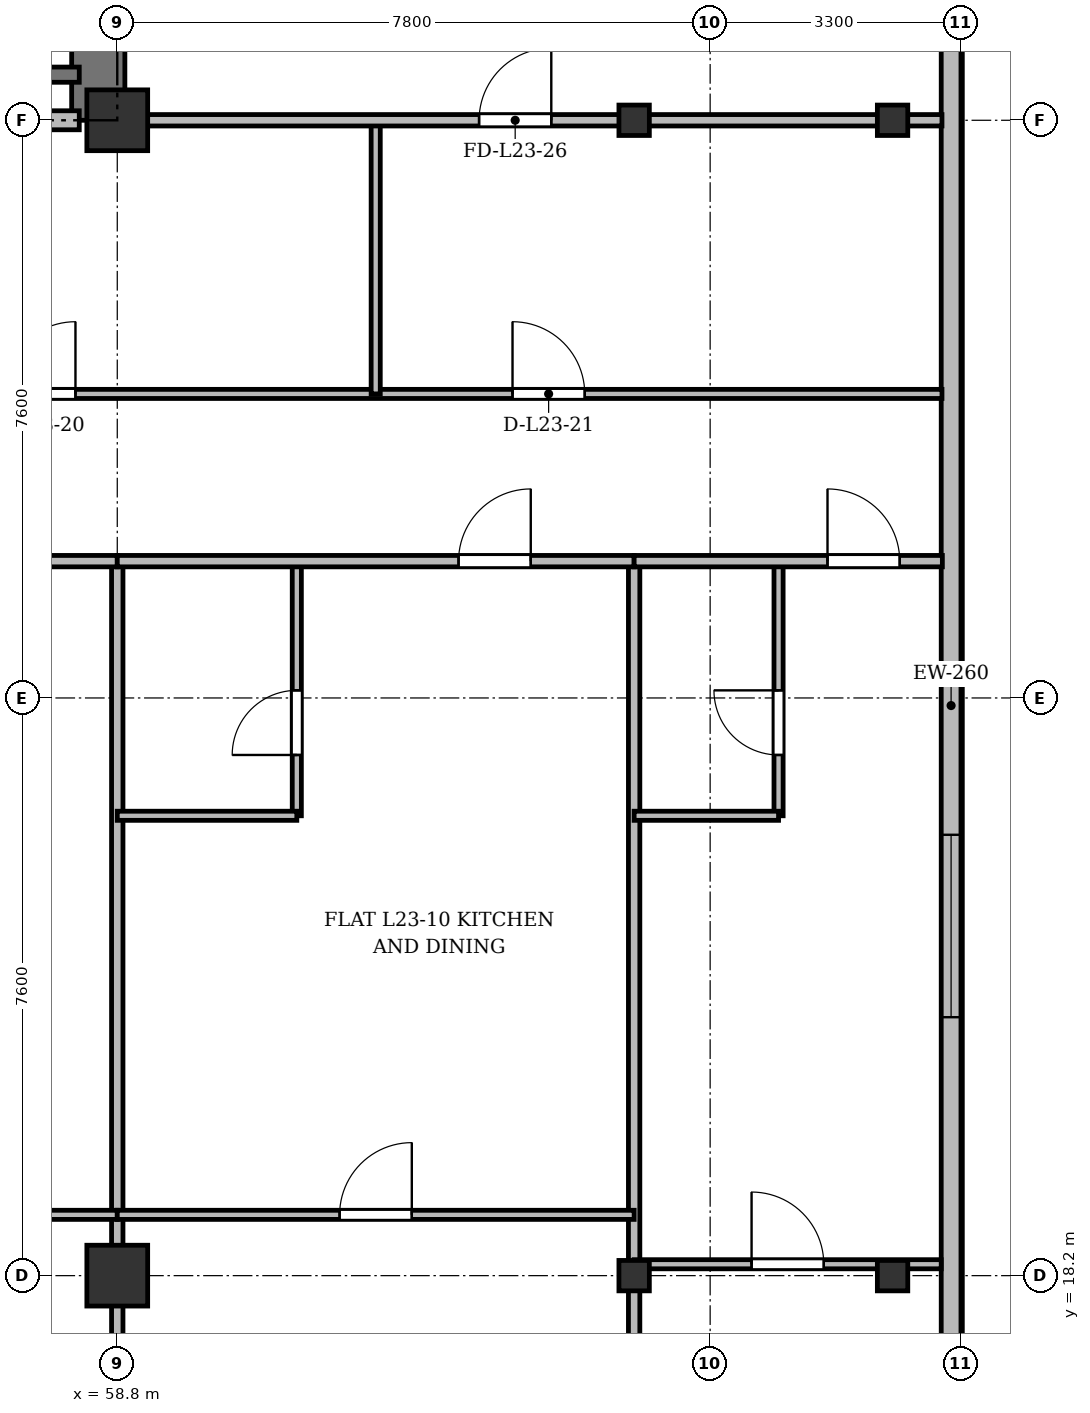
"""IFC4 building model, lengths in metres.
Left out: names, types, materials, properties, quantities, classifications, styles, units other than length and angle.
Written with IfcOpenShell. Run it as: python <this file> out.ifc"""

import sys

from ifc_helpers import new_model, si_unit, direction, frame, frame_2d, origin, origin_2d, place, context, subcontext, project, spatial, rectangle, i_section, extrude, source, transform, mapped, element, fill, save


model = new_model("IFC4")
c1 = context("Model", 3, precision=1e-05, world=origin(), true_north=direction((0.0, 1.0)))
c2 = subcontext(c1, "Body", "Model", "MODEL_VIEW")
j1 = project(units=[si_unit("LENGTHUNIT", "METRE"), si_unit("PLANEANGLEUNIT", "RADIAN")], contexts=[c1])
p1 = place(None, origin())
s1 = spatial("IfcSite", under=j1, at=p1, CompositionType="ELEMENT")
p2 = place(p1, origin())
s2 = spatial("IfcBuilding", under=s1, at=p2, CompositionType="ELEMENT")
p3 = place(p2, frame((0.0, 0.0, 92.5)))
s3 = spatial("IfcBuildingStorey", under=s2, at=p3, CompositionType="ELEMENT", Elevation=92.5)
m1 = source(origin(), c2, "Body", "SweptSolid", [
    extrude(rectangle(XDim=0.8, YDim=0.8, at=origin_2d()), origin(), (0.0, 0.0, 1.0), 3.6),
])
for number, where, z_axis, x_axis in (
    (1, (58.8, 18.2, 0.0), (0.0, 0.0, 1.0), (1.0, 0.0, 0.0)),
    (2, (58.8, 33.4, 0.0), (0.0, 0.0, 1.0), (1.0, 0.0, 0.0)),
):
    element("IfcColumn", number, at=place(p3, frame(where, z_axis=z_axis, x_axis=x_axis)), inside=s3, PredefinedType="COLUMN", context=c2, shape_type="MappedRepresentation", body=[
        mapped(m1, transform((0.0, 0.0, 0.0), x_axis=(1.0, 0.0, 0.0), y_axis=(0.0, 1.0, 0.0), z_axis=(0.0, 0.0, 1.0), scale=1.0)),
    ])
m2 = source(origin(), c2, "Body", "SweptSolid", [
    extrude(i_section(OverallWidth=0.4, OverallDepth=0.4, WebThickness=0.022, FlangeThickness=0.035, at=origin_2d()), origin(), (0.0, 0.0, 1.0), 3.6),
])
for number, where, z_axis, x_axis in (
    (3, (65.6, 18.2, 0.0), (0.0, 0.0, 1.0), (1.0, 0.0, 0.0)),
    (4, (65.6, 33.4, 0.0), (0.0, 0.0, 1.0), (1.0, 0.0, 0.0)),
    (5, (69.0, 18.2, 0.0), (0.0, 0.0, 1.0), (1.0, 0.0, 0.0)),
    (6, (69.0, 33.4, 0.0), (0.0, 0.0, 1.0), (1.0, 0.0, 0.0)),
):
    element("IfcColumn", number, at=place(p3, frame(where, z_axis=z_axis, x_axis=x_axis)), inside=s3, PredefinedType="COLUMN", context=c2, shape_type="MappedRepresentation", body=[
        mapped(m2, transform((0.0, 0.0, 0.0), x_axis=(1.0, 0.0, 0.0), y_axis=(0.0, 1.0, 0.0), z_axis=(0.0, 0.0, 1.0), scale=1.0)),
    ])
p4 = place(p3, frame((69.77, 45.5, 0.0), z_axis=(0.0, 0.0, 1.0), x_axis=(0.0, -1.0, 0.0)))
e7 = element("IfcWall", 7, at=p4, inside=s3, PredefinedType="SOLIDWALL", context=c2, shape_type="SweptSolid", body=[
    extrude(rectangle(XDim=39.6, YDim=0.26, at=frame_2d((19.8, 0.0))), origin(), (0.0, 0.0, 1.0), 3.34),
])
p5 = place(p4, frame((36.95, 0.0, 0.92)))
e8 = element("IfcOpeningElement", 8, at=p5, cuts=e7, PredefinedType="OPENING", context=c2, shape_type="SweptSolid", body=[
    extrude(rectangle(XDim=1.2, YDim=1.65, at=frame_2d((0.6, 0.825))), frame((0.0, 0.14, 0.0), z_axis=(0.0, -1.0, 0.0), x_axis=(1.0, 0.0, 0.0)), (0.0, 0.0, 1.0), 0.28),
])
p6 = place(p4, frame((32.9, 0.0, 0.92)))
e9 = element("IfcOpeningElement", 9, at=p6, cuts=e7, PredefinedType="OPENING", context=c2, shape_type="SweptSolid", body=[
    extrude(rectangle(XDim=2.4, YDim=2.1, at=frame_2d((1.2, 1.05))), frame((0.0, 0.14, 0.0), z_axis=(0.0, -1.0, 0.0), x_axis=(1.0, 0.0, 0.0)), (0.0, 0.0, 1.0), 0.28),
])
p7 = place(p4, frame((28.7, 0.0, 0.92)))
e10 = element("IfcOpeningElement", 10, at=p7, cuts=e7, PredefinedType="OPENING", context=c2, shape_type="SweptSolid", body=[
    extrude(rectangle(XDim=2.4, YDim=2.1, at=frame_2d((1.2, 1.05))), frame((0.0, 0.14, 0.0), z_axis=(0.0, -1.0, 0.0), x_axis=(1.0, 0.0, 0.0)), (0.0, 0.0, 1.0), 0.28),
])
p8 = place(p4, frame((21.5, 0.0, 0.92)))
e11 = element("IfcOpeningElement", 11, at=p8, cuts=e7, PredefinedType="OPENING", context=c2, shape_type="SweptSolid", body=[
    extrude(rectangle(XDim=2.4, YDim=2.1, at=frame_2d((1.2, 1.05))), frame((0.0, 0.14, 0.0), z_axis=(0.0, -1.0, 0.0), x_axis=(1.0, 0.0, 0.0)), (0.0, 0.0, 1.0), 0.28),
])
p9 = place(p4, frame((7.5, 0.0, 0.92)))
e12 = element("IfcOpeningElement", 12, at=p9, cuts=e7, PredefinedType="OPENING", context=c2, shape_type="SweptSolid", body=[
    extrude(rectangle(XDim=2.4, YDim=2.1, at=frame_2d((1.2, 1.05))), frame((0.0, 0.14, 0.0), z_axis=(0.0, -1.0, 0.0), x_axis=(1.0, 0.0, 0.0)), (0.0, 0.0, 1.0), 0.28),
])
p10 = place(p4, frame((4.5, 0.0, 0.92)))
e13 = element("IfcOpeningElement", 13, at=p10, cuts=e7, PredefinedType="OPENING", context=c2, shape_type="SweptSolid", body=[
    extrude(rectangle(XDim=1.2, YDim=1.65, at=frame_2d((0.6, 0.825))), frame((0.0, 0.14, 0.0), z_axis=(0.0, -1.0, 0.0), x_axis=(1.0, 0.0, 0.0)), (0.0, 0.0, 1.0), 0.28),
])
p11 = place(p4, frame((1.15, 0.0, 0.92)))
e14 = element("IfcOpeningElement", 14, at=p11, cuts=e7, PredefinedType="OPENING", context=c2, shape_type="SweptSolid", body=[
    extrude(rectangle(XDim=1.2, YDim=1.65, at=frame_2d((0.6, 0.825))), frame((0.0, 0.14, 0.0), z_axis=(0.0, -1.0, 0.0), x_axis=(1.0, 0.0, 0.0)), (0.0, 0.0, 1.0), 0.28),
])
p12 = place(p3, frame((58.55, 33.4, 0.0), z_axis=(0.0, 0.0, 1.0), x_axis=(0.0, 1.0, 0.0)))
e15 = element("IfcWall", 15, at=p12, inside=s3, PredefinedType="SHEAR", context=c2, shape_type="SweptSolid", body=[
    extrude(rectangle(XDim=11.7, YDim=0.7, at=frame_2d((5.85, 0.0))), origin(), (0.0, 0.0, 1.0), 3.34),
])
p13 = place(p3, frame((54.9, 34.0, 0.0), z_axis=(0.0, 0.0, 1.0), x_axis=(1.0, 0.0, 0.0)))
e16 = element("IfcWall", 16, at=p13, inside=s3, PredefinedType="SHEAR", context=c2, shape_type="SweptSolid", body=[
    extrude(rectangle(XDim=3.4, YDim=0.2, at=frame_2d((1.7, 0.0))), origin(), (0.0, 0.0, 1.0), 3.34),
])
p14 = place(p3, frame((47.15, 33.4, 0.0), z_axis=(0.0, 0.0, 1.0), x_axis=(1.0, 0.0, 0.0)))
e17 = element("IfcWall", 17, at=p14, inside=s3, PredefinedType="PARTITIONING", context=c2, shape_type="SweptSolid", body=[
    extrude(rectangle(XDim=11.15, YDim=0.25, at=frame_2d((5.575, 0.0))), origin(), (0.0, 0.0, 1.0), 2.752),
])
p15 = place(p14, frame((0.7, 0.0, 0.0)))
e18 = element("IfcOpeningElement", 18, at=p15, cuts=e17, PredefinedType="OPENING", context=c2, shape_type="SweptSolid", body=[
    extrude(rectangle(XDim=0.95, YDim=2.15, at=frame_2d((0.475, 1.075))), frame((0.0, 0.135, 0.0), z_axis=(0.0, -1.0, 0.0), x_axis=(1.0, 0.0, 0.0)), (0.0, 0.0, 1.0), 0.27),
])
p16 = place(p14, frame((6.0, 0.0, 0.0)))
e19 = element("IfcOpeningElement", 19, at=p16, cuts=e17, PredefinedType="OPENING", context=c2, shape_type="SweptSolid", body=[
    extrude(rectangle(XDim=1.2, YDim=2.15, at=frame_2d((0.6, 1.075))), frame((0.0, 0.135, 0.0), z_axis=(0.0, -1.0, 0.0), x_axis=(1.0, 0.0, 0.0)), (0.0, 0.0, 1.0), 0.27),
])
p17 = place(p3, frame((54.8, 29.8, 0.0), z_axis=(0.0, 0.0, 1.0), x_axis=(1.0, 0.0, 0.0)))
e20 = element("IfcWall", 20, at=p17, inside=s3, PredefinedType="PARTITIONING", context=c2, shape_type="SweptSolid", body=[
    extrude(rectangle(XDim=14.85, YDim=0.12, at=frame_2d((7.425, 0.0))), origin(), (0.0, 0.0, 1.0), 2.84),
])
p18 = place(p17, frame((2.5, 0.0, 0.0)))
e21 = element("IfcOpeningElement", 21, at=p18, cuts=e20, PredefinedType="OPENING", context=c2, shape_type="SweptSolid", body=[
    extrude(rectangle(XDim=0.95, YDim=2.15, at=frame_2d((0.475, 1.075))), frame((0.0, 0.07, 0.0), z_axis=(0.0, -1.0, 0.0), x_axis=(1.0, 0.0, 0.0)), (0.0, 0.0, 1.0), 0.14),
])
p19 = place(p17, frame((9.2, 0.0, 0.0)))
e22 = element("IfcOpeningElement", 22, at=p19, cuts=e20, PredefinedType="OPENING", context=c2, shape_type="SweptSolid", body=[
    extrude(rectangle(XDim=0.95, YDim=2.15, at=frame_2d((0.475, 1.075))), frame((0.0, 0.07, 0.0), z_axis=(0.0, -1.0, 0.0), x_axis=(1.0, 0.0, 0.0)), (0.0, 0.0, 1.0), 0.14),
])
p20 = place(p3, frame((62.2, 29.8, 0.0), z_axis=(0.0, 0.0, 1.0), x_axis=(0.0, 1.0, 0.0)))
e23 = element("IfcWall", 23, at=p20, inside=s3, PredefinedType="PARTITIONING", context=c2, shape_type="SweptSolid", body=[
    extrude(rectangle(XDim=3.6, YDim=0.12, at=frame_2d((1.8, 0.0))), origin(), (0.0, 0.0, 1.0), 2.752),
])
p21 = place(p3, frame((58.8, 33.4, 0.0), z_axis=(0.0, 0.0, 1.0), x_axis=(1.0, 0.0, 0.0)))
e24 = element("IfcWall", 24, at=p21, inside=s3, PredefinedType="PARTITIONING", context=c2, shape_type="SweptSolid", body=[
    extrude(rectangle(XDim=10.85, YDim=0.15, at=frame_2d((5.425, 0.0))), origin(), (0.0, 0.0, 1.0), 2.752),
])
p22 = place(p21, frame((4.76, 0.0, 0.0)))
e25 = element("IfcOpeningElement", 25, at=p22, cuts=e24, PredefinedType="OPENING", context=c2, shape_type="SweptSolid", body=[
    extrude(rectangle(XDim=0.95, YDim=2.15, at=frame_2d((0.475, 1.075))), frame((0.0, 0.085, 0.0), z_axis=(0.0, -1.0, 0.0), x_axis=(1.0, 0.0, 0.0)), (0.0, 0.0, 1.0), 0.17),
])
for number, where, z_axis, x_axis in (
    (26, (58.8, 3.145, 0.0), (0.0, 0.0, 1.0), (0.0, 1.0, 0.0)),
    (27, (65.6, 3.145, 0.0), (0.0, 0.0, 1.0), (0.0, 1.0, 0.0)),
):
    element("IfcWall", number, at=place(p3, frame(where, z_axis=z_axis, x_axis=x_axis)), inside=s3, PredefinedType="PARTITIONING", context=c2, shape_type="SweptSolid", body=[
        extrude(rectangle(XDim=24.455, YDim=0.15, at=frame_2d((12.228, 0.0))), origin(), (0.0, 0.0, 1.0), 2.84),
    ])
p23 = place(p3, frame((51.0, 19.0, 0.0), z_axis=(0.0, 0.0, 1.0), x_axis=(1.0, 0.0, 0.0)))
e28 = element("IfcWall", 28, at=p23, inside=s3, PredefinedType="PARTITIONING", context=c2, shape_type="SweptSolid", body=[
    extrude(rectangle(XDim=7.8, YDim=0.12, at=frame_2d((3.9, 0.0))), origin(), (0.0, 0.0, 1.0), 2.84),
])
p24 = place(p23, frame((3.333, 0.0, 0.0)))
e29 = element("IfcOpeningElement", 29, at=p24, cuts=e28, PredefinedType="OPENING", context=c2, shape_type="SweptSolid", body=[
    extrude(rectangle(XDim=0.95, YDim=2.15, at=frame_2d((0.475, 1.075))), frame((0.0, 0.07, 0.0), z_axis=(0.0, -1.0, 0.0), x_axis=(1.0, 0.0, 0.0)), (0.0, 0.0, 1.0), 0.14),
])
p25 = place(p3, frame((51.0, 27.6, 0.0), z_axis=(0.0, 0.0, 1.0), x_axis=(1.0, 0.0, 0.0)))
e30 = element("IfcWall", 30, at=p25, inside=s3, PredefinedType="PARTITIONING", context=c2, shape_type="SweptSolid", body=[
    extrude(rectangle(XDim=7.8, YDim=0.15, at=frame_2d((3.9, 0.0))), origin(), (0.0, 0.0, 1.0), 2.84),
])
p26 = place(p25, frame((5.172, 0.0, 0.0)))
e31 = element("IfcOpeningElement", 31, at=p26, cuts=e30, PredefinedType="OPENING", context=c2, shape_type="SweptSolid", body=[
    extrude(rectangle(XDim=0.95, YDim=2.15, at=frame_2d((0.475, 1.075))), frame((0.0, 0.085, 0.0), z_axis=(0.0, -1.0, 0.0), x_axis=(1.0, 0.0, 0.0)), (0.0, 0.0, 1.0), 0.17),
])
p27 = place(p3, frame((58.8, 19.0, 0.0), z_axis=(0.0, 0.0, 1.0), x_axis=(1.0, 0.0, 0.0)))
e32 = element("IfcWall", 32, at=p27, inside=s3, PredefinedType="PARTITIONING", context=c2, shape_type="SweptSolid", body=[
    extrude(rectangle(XDim=6.8, YDim=0.12, at=frame_2d((3.4, 0.0))), origin(), (0.0, 0.0, 1.0), 2.84),
])
p28 = place(p27, frame((2.925, 0.0, 0.0)))
e33 = element("IfcOpeningElement", 33, at=p28, cuts=e32, PredefinedType="OPENING", context=c2, shape_type="SweptSolid", body=[
    extrude(rectangle(XDim=0.95, YDim=2.15, at=frame_2d((0.475, 1.075))), frame((0.0, 0.07, 0.0), z_axis=(0.0, -1.0, 0.0), x_axis=(1.0, 0.0, 0.0)), (0.0, 0.0, 1.0), 0.14),
])
p29 = place(p3, frame((61.162, 24.25, 0.0), z_axis=(0.0, 0.0, 1.0), x_axis=(0.0, 1.0, 0.0)))
e34 = element("IfcWall", 34, at=p29, inside=s3, PredefinedType="PARTITIONING", context=c2, shape_type="SweptSolid", body=[
    extrude(rectangle(XDim=3.35, YDim=0.12, at=frame_2d((1.675, 0.0))), origin(), (0.0, 0.0, 1.0), 2.99),
])
p30 = place(p29, frame((0.8, 0.0, 0.0)))
e35 = element("IfcOpeningElement", 35, at=p30, cuts=e34, PredefinedType="OPENING", context=c2, shape_type="SweptSolid", body=[
    extrude(rectangle(XDim=0.85, YDim=2.1, at=frame_2d((0.425, 1.05))), frame((0.0, 0.07, 0.0), z_axis=(0.0, -1.0, 0.0), x_axis=(1.0, 0.0, 0.0)), (0.0, 0.0, 1.0), 0.14),
])
p31 = place(p3, frame((58.8, 24.25, 0.0), z_axis=(0.0, 0.0, 1.0), x_axis=(1.0, 0.0, 0.0)))
e36 = element("IfcWall", 36, at=p31, inside=s3, PredefinedType="PARTITIONING", context=c2, shape_type="SweptSolid", body=[
    extrude(rectangle(XDim=2.362, YDim=0.12, at=frame_2d((1.181, 0.0))), origin(), (0.0, 0.0, 1.0), 2.84),
])
p32 = place(p3, frame((58.8, 27.6, 0.0), z_axis=(0.0, 0.0, 1.0), x_axis=(1.0, 0.0, 0.0)))
e37 = element("IfcWall", 37, at=p32, inside=s3, PredefinedType="PARTITIONING", context=c2, shape_type="SweptSolid", body=[
    extrude(rectangle(XDim=6.8, YDim=0.15, at=frame_2d((3.4, 0.0))), origin(), (0.0, 0.0, 1.0), 2.84),
])
p33 = place(p32, frame((4.49, 0.0, 0.0)))
e38 = element("IfcOpeningElement", 38, at=p33, cuts=e37, PredefinedType="OPENING", context=c2, shape_type="SweptSolid", body=[
    extrude(rectangle(XDim=0.95, YDim=2.15, at=frame_2d((0.475, 1.075))), frame((0.0, 0.085, 0.0), z_axis=(0.0, -1.0, 0.0), x_axis=(1.0, 0.0, 0.0)), (0.0, 0.0, 1.0), 0.17),
])
p34 = place(p3, frame((65.6, 18.35, 0.0), z_axis=(0.0, 0.0, 1.0), x_axis=(1.0, 0.0, 0.0)))
e39 = element("IfcWall", 39, at=p34, inside=s3, PredefinedType="PARTITIONING", context=c2, shape_type="SweptSolid", body=[
    extrude(rectangle(XDim=4.04, YDim=0.12, at=frame_2d((2.02, 0.0))), origin(), (0.0, 0.0, 1.0), 2.752),
])
p35 = place(p34, frame((1.545, 0.0, 0.0)))
e40 = element("IfcOpeningElement", 40, at=p35, cuts=e39, PredefinedType="OPENING", context=c2, shape_type="SweptSolid", body=[
    extrude(rectangle(XDim=0.95, YDim=2.15, at=frame_2d((0.475, 1.075))), frame((0.0, 0.07, 0.0), z_axis=(0.0, -1.0, 0.0), x_axis=(1.0, 0.0, 0.0)), (0.0, 0.0, 1.0), 0.14),
])
p36 = place(p3, frame((67.5, 24.25, 0.0), z_axis=(0.0, 0.0, 1.0), x_axis=(0.0, 1.0, 0.0)))
e41 = element("IfcWall", 41, at=p36, inside=s3, PredefinedType="PARTITIONING", context=c2, shape_type="SweptSolid", body=[
    extrude(rectangle(XDim=3.35, YDim=0.12, at=frame_2d((1.675, 0.0))), origin(), (0.0, 0.0, 1.0), 2.99),
])
p37 = place(p36, frame((0.8, 0.0, 0.0)))
e42 = element("IfcOpeningElement", 42, at=p37, cuts=e41, PredefinedType="OPENING", context=c2, shape_type="SweptSolid", body=[
    extrude(rectangle(XDim=0.85, YDim=2.1, at=frame_2d((0.425, 1.05))), frame((0.0, 0.07, 0.0), z_axis=(0.0, -1.0, 0.0), x_axis=(1.0, 0.0, 0.0)), (0.0, 0.0, 1.0), 0.14),
])
p38 = place(p3, frame((65.6, 24.25, 0.0), z_axis=(0.0, 0.0, 1.0), x_axis=(1.0, 0.0, 0.0)))
e43 = element("IfcWall", 43, at=p38, inside=s3, PredefinedType="PARTITIONING", context=c2, shape_type="SweptSolid", body=[
    extrude(rectangle(XDim=1.9, YDim=0.12, at=frame_2d((0.95, 0.0))), origin(), (0.0, 0.0, 1.0), 2.84),
])
p39 = place(p3, frame((65.6, 27.6, 0.0), z_axis=(0.0, 0.0, 1.0), x_axis=(1.0, 0.0, 0.0)))
e44 = element("IfcWall", 44, at=p39, inside=s3, PredefinedType="PARTITIONING", context=c2, shape_type="SweptSolid", body=[
    extrude(rectangle(XDim=4.055, YDim=0.15, at=frame_2d((2.027, 0.0))), origin(), (0.0, 0.0, 1.0), 2.84),
])
p40 = place(p39, frame((2.544, 0.0, 0.0)))
e45 = element("IfcOpeningElement", 45, at=p40, cuts=e44, PredefinedType="OPENING", context=c2, shape_type="SweptSolid", body=[
    extrude(rectangle(XDim=0.95, YDim=2.15, at=frame_2d((0.475, 1.075))), frame((0.0, 0.085, 0.0), z_axis=(0.0, -1.0, 0.0), x_axis=(1.0, 0.0, 0.0)), (0.0, 0.0, 1.0), 0.17),
])
m3 = source(origin(), c2, "Body", "SweptSolid", [
    extrude(rectangle(XDim=2.4, YDim=2.1, at=frame_2d((1.2, 1.05))), frame((0.0, 0.03, 0.0), z_axis=(0.0, -1.0, 0.0), x_axis=(1.0, 0.0, 0.0)), (0.0, 0.0, 1.0), 0.06),
])
p41 = place(p8, origin())
e46 = element("IfcWindow", 46, at=p41, inside=s3, PartitioningType="SINGLE_PANEL", PredefinedType="WINDOW", context=c2, shape_type="MappedRepresentation", body=[
    mapped(m3, transform((0.0, 0.0, 0.0), x_axis=(1.0, 0.0, 0.0), y_axis=(0.0, 1.0, 0.0), z_axis=(0.0, 0.0, 1.0), scale=1.0)),
])
fill(e11, e46)
m4 = source(origin(), c2, "Body", "SweptSolid", [
    extrude(rectangle(XDim=0.95, YDim=2.15, at=frame_2d((0.475, 1.075))), frame((0.0, 0.025, 0.0), z_axis=(0.0, -1.0, 0.0), x_axis=(1.0, 0.0, 0.0)), (0.0, 0.0, 1.0), 0.05),
])
p42 = place(p18, origin())
e47 = element("IfcDoor", 47, at=p42, inside=s3, OperationType="SINGLE_SWING_RIGHT", PredefinedType="DOOR", context=c2, shape_type="MappedRepresentation", body=[
    mapped(m4, transform((0.0, 0.0, 0.0), x_axis=(1.0, 0.0, 0.0), y_axis=(0.0, 1.0, 0.0), z_axis=(0.0, 0.0, 1.0), scale=1.0)),
])
fill(e21, e47)
p43 = place(p19, origin())
e48 = element("IfcDoor", 48, at=p43, inside=s3, OperationType="SINGLE_SWING_LEFT", PredefinedType="DOOR", context=c2, shape_type="MappedRepresentation", body=[
    mapped(m4, transform((0.0, 0.0, 0.0), x_axis=(1.0, 0.0, 0.0), y_axis=(0.0, 1.0, 0.0), z_axis=(0.0, 0.0, 1.0), scale=1.0)),
])
fill(e22, e48)
p44 = place(p22, origin())
e49 = element("IfcDoor", 49, at=p44, inside=s3, OperationType="SINGLE_SWING_RIGHT", PredefinedType="DOOR", context=c2, shape_type="MappedRepresentation", body=[
    mapped(m4, transform((0.0, 0.0, 0.0), x_axis=(1.0, 0.0, 0.0), y_axis=(0.0, 1.0, 0.0), z_axis=(0.0, 0.0, 1.0), scale=1.0)),
])
fill(e25, e49)
p45 = place(p28, origin())
e50 = element("IfcDoor", 50, at=p45, inside=s3, OperationType="SINGLE_SWING_RIGHT", PredefinedType="DOOR", context=c2, shape_type="MappedRepresentation", body=[
    mapped(m4, transform((0.0, 0.0, 0.0), x_axis=(1.0, 0.0, 0.0), y_axis=(0.0, 1.0, 0.0), z_axis=(0.0, 0.0, 1.0), scale=1.0)),
])
fill(e33, e50)
m5 = source(origin(), c2, "Body", "SweptSolid", [
    extrude(rectangle(XDim=0.85, YDim=2.1, at=frame_2d((0.425, 1.05))), frame((0.0, 0.025, 0.0), z_axis=(0.0, -1.0, 0.0), x_axis=(1.0, 0.0, 0.0)), (0.0, 0.0, 1.0), 0.05),
])
p46 = place(p30, origin())
e51 = element("IfcDoor", 51, at=p46, inside=s3, OperationType="SINGLE_SWING_LEFT", PredefinedType="DOOR", context=c2, shape_type="MappedRepresentation", body=[
    mapped(m5, transform((0.0, 0.0, 0.0), x_axis=(1.0, 0.0, 0.0), y_axis=(0.0, 1.0, 0.0), z_axis=(0.0, 0.0, 1.0), scale=1.0)),
])
fill(e35, e51)
p47 = place(p33, origin())
e52 = element("IfcDoor", 52, at=p47, inside=s3, OperationType="SINGLE_SWING_RIGHT", PredefinedType="DOOR", context=c2, shape_type="MappedRepresentation", body=[
    mapped(m4, transform((0.0, 0.0, 0.0), x_axis=(1.0, 0.0, 0.0), y_axis=(0.0, 1.0, 0.0), z_axis=(0.0, 0.0, 1.0), scale=1.0)),
])
fill(e38, e52)
p48 = place(p35, origin())
e53 = element("IfcDoor", 53, at=p48, inside=s3, OperationType="SINGLE_SWING_LEFT", PredefinedType="DOOR", context=c2, shape_type="MappedRepresentation", body=[
    mapped(m4, transform((0.0, 0.0, 0.0), x_axis=(1.0, 0.0, 0.0), y_axis=(0.0, 1.0, 0.0), z_axis=(0.0, 0.0, 1.0), scale=1.0)),
])
fill(e40, e53)
p49 = place(p37, origin())
e54 = element("IfcDoor", 54, at=p49, inside=s3, OperationType="SINGLE_SWING_RIGHT", PredefinedType="DOOR", context=c2, shape_type="MappedRepresentation", body=[
    mapped(m5, transform((0.0, 0.0, 0.0), x_axis=(1.0, 0.0, 0.0), y_axis=(0.0, 1.0, 0.0), z_axis=(0.0, 0.0, 1.0), scale=1.0)),
])
fill(e42, e54)
p50 = place(p40, origin())
e55 = element("IfcDoor", 55, at=p50, inside=s3, OperationType="SINGLE_SWING_LEFT", PredefinedType="DOOR", context=c2, shape_type="MappedRepresentation", body=[
    mapped(m4, transform((0.0, 0.0, 0.0), x_axis=(1.0, 0.0, 0.0), y_axis=(0.0, 1.0, 0.0), z_axis=(0.0, 0.0, 1.0), scale=1.0)),
])
fill(e45, e55)
save(model, sys.argv[1])
